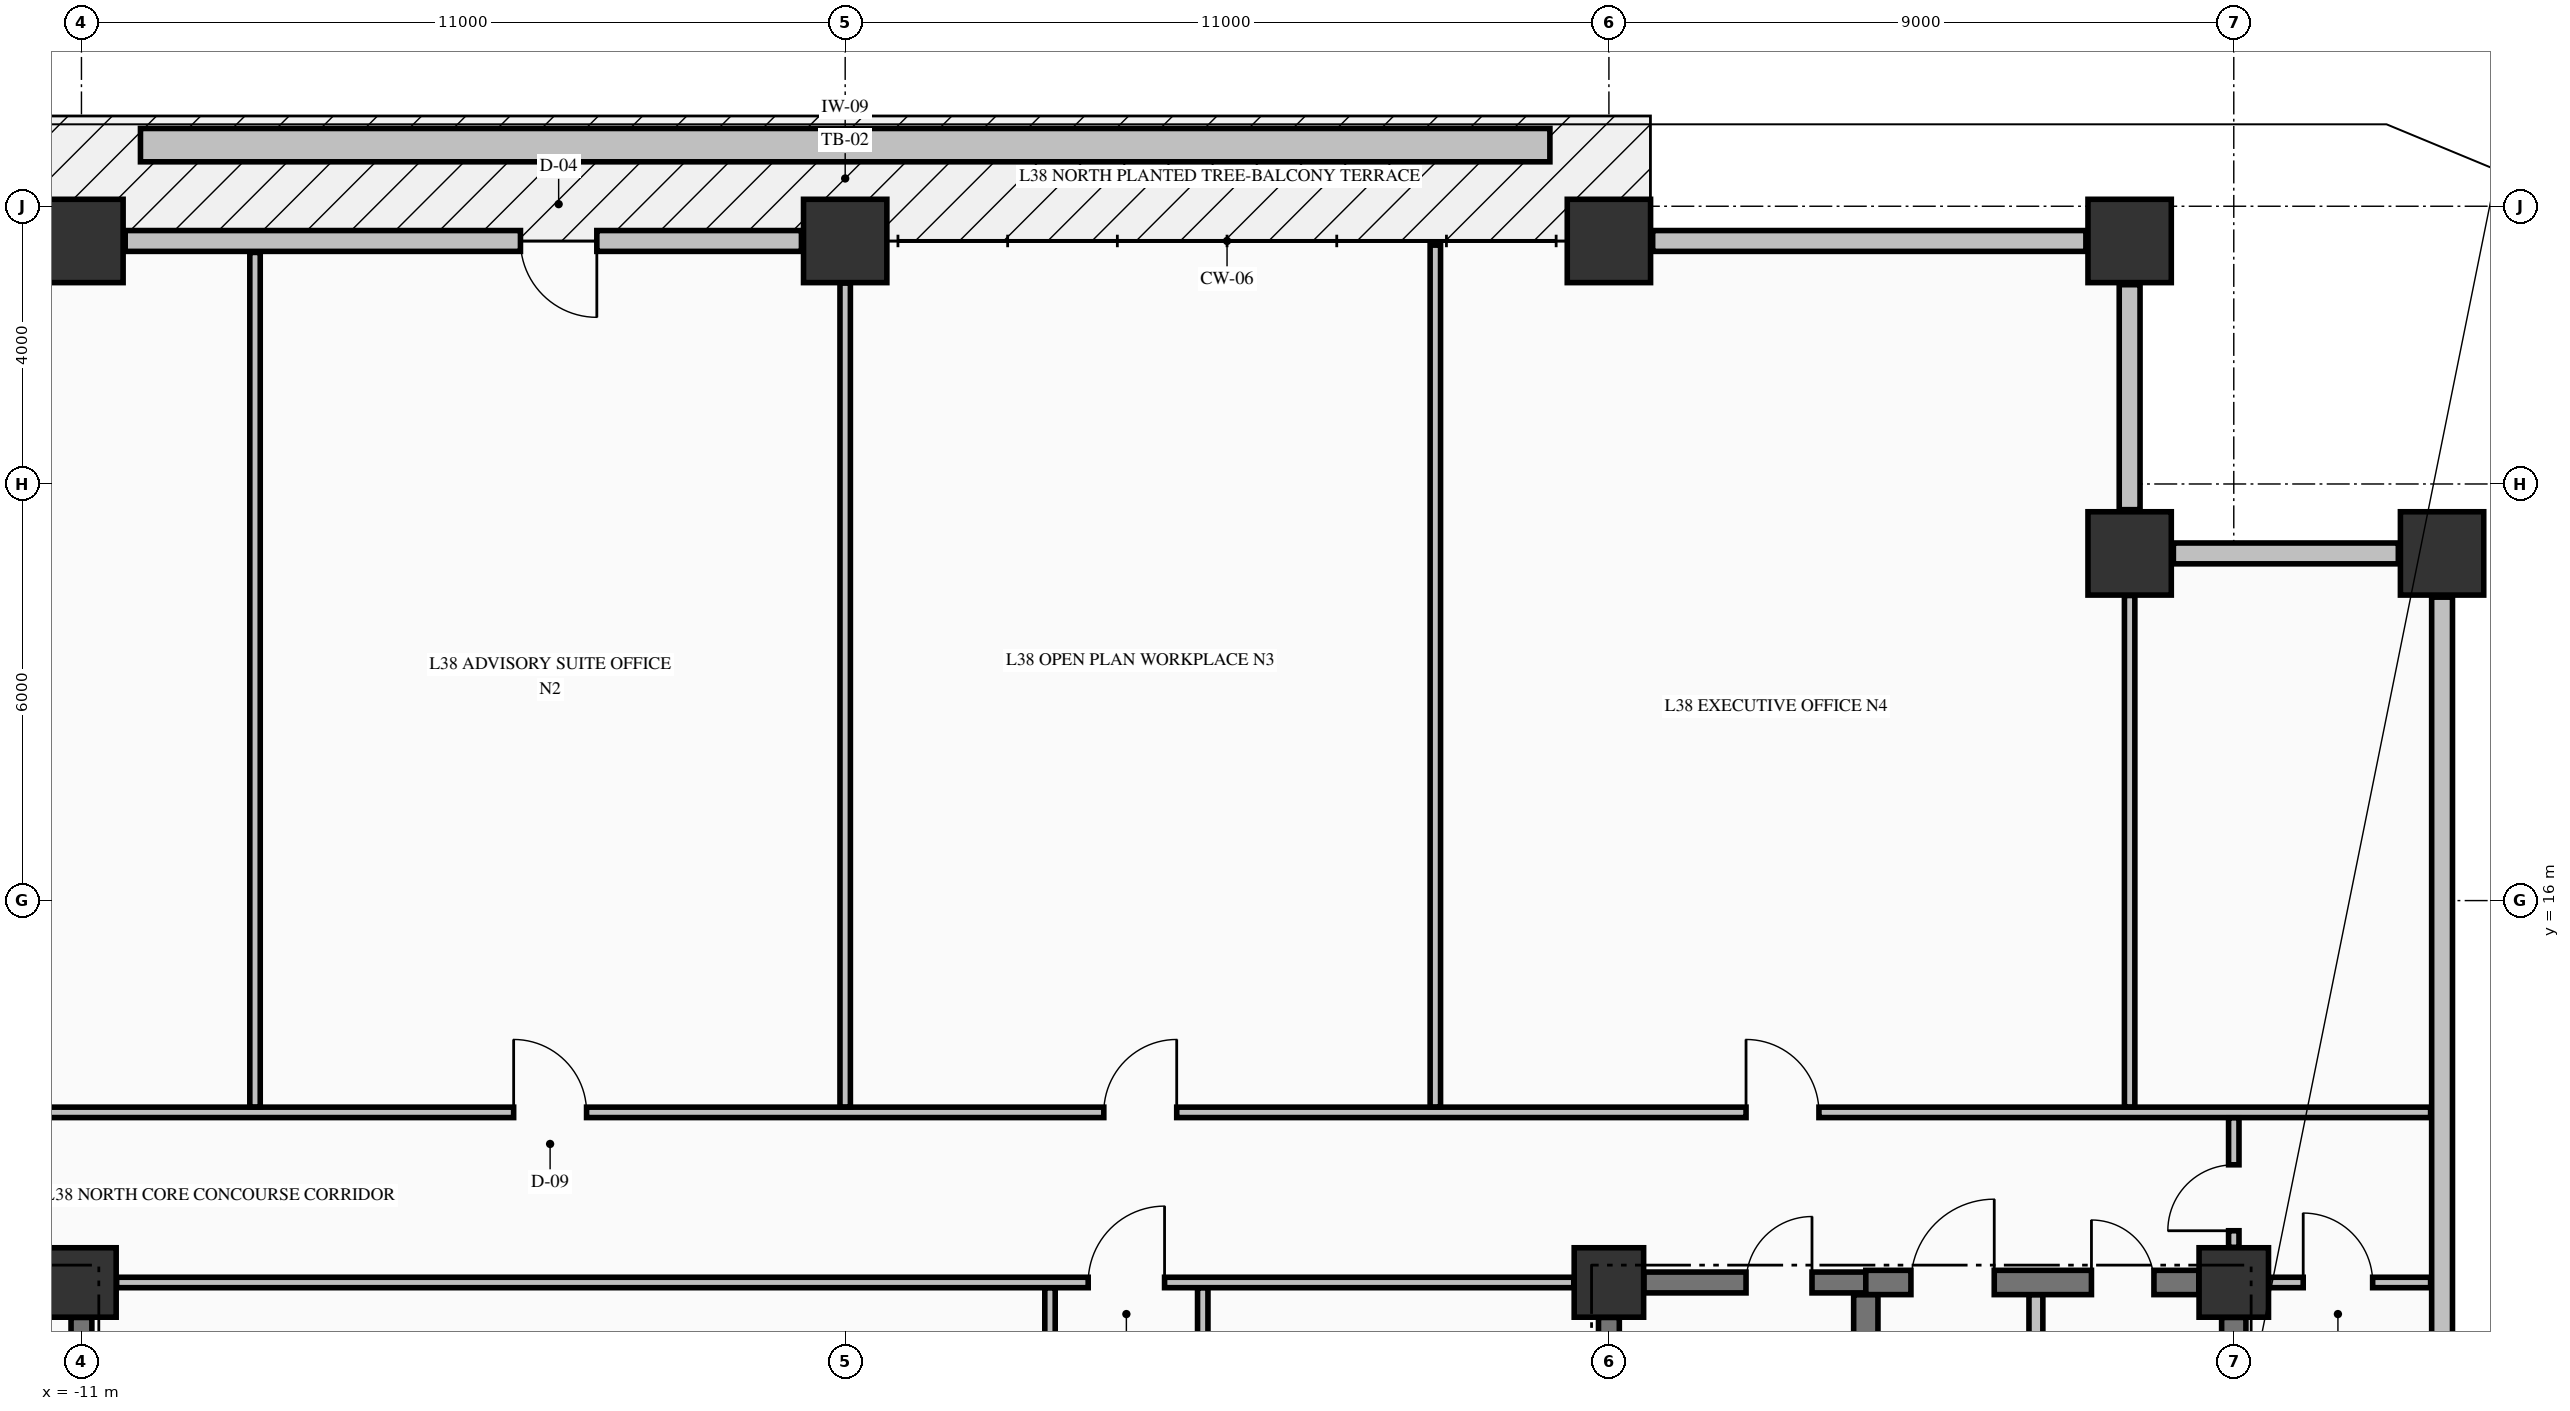
"""IFC4 building model, lengths in metres.
Left out: names, types, materials, properties, quantities, classifications, styles, units other than length and angle.
Written with IfcOpenShell. Run it as: python <this file> out.ifc"""

import sys

from ifc_helpers import new_model, si_unit, direction, frame, frame_2d, origin, origin_2d, place, context, subcontext, project, spatial, rectangle, extrude, element, fill, save


model = new_model("IFC4")
c1 = context("Model", 3, precision=1e-05, world=origin(), true_north=direction((0.0, 1.0)))
c2 = subcontext(c1, "Body", "Model", "MODEL_VIEW")
j1 = project(units=[si_unit("LENGTHUNIT", "METRE"), si_unit("PLANEANGLEUNIT", "RADIAN")], contexts=[c1])
p1 = place(None, origin())
s1 = spatial("IfcSite", under=j1, at=p1, CompositionType="ELEMENT")
p2 = place(p1, origin())
s2 = spatial("IfcBuilding", under=s1, at=p2, CompositionType="ELEMENT")
p3 = place(p2, frame((0.0, 0.0, 149.91)))
s3 = spatial("IfcBuildingStorey", under=s2, at=p3, CompositionType="ELEMENT", Elevation=149.91)
for number, where, z_axis, x_axis in (
    (1, (-11.0, 25.5, -0.25), (0.0, 0.0, 1.0), (1.0, 0.0, 0.0)),
    (2, (0.0, 25.5, -0.25), (0.0, 0.0, 1.0), (1.0, 0.0, 0.0)),
    (3, (11.0, 25.5, -0.25), (0.0, 0.0, 1.0), (1.0, 0.0, 0.0)),
    (4, (18.5, 25.5, -0.25), (0.0, 0.0, 1.0), (1.0, 0.0, 0.0)),
    (5, (23.0, 21.0, -0.25), (0.0, 0.0, 1.0), (1.0, 0.0, 0.0)),
    (6, (18.5, 21.0, -0.25), (0.0, 0.0, 1.0), (1.0, 0.0, 0.0)),
):
    element("IfcColumn", number, at=place(p3, frame(where, z_axis=z_axis, x_axis=x_axis)), inside=s3, PredefinedType="COLUMN", context=c2, shape_type="SweptSolid", body=[
        extrude(rectangle(XDim=1.2, YDim=1.2, at=origin_2d()), origin(), (0.0, 0.0, 1.0), 3.395),
    ])
for number, where, z_axis, x_axis in (
    (7, (-11.0, 10.5, -0.25), (0.0, 0.0, 1.0), (1.0, 0.0, 0.0)),
    (8, (11.0, 10.5, -0.25), (0.0, 0.0, 1.0), (1.0, 0.0, 0.0)),
    (9, (20.0, 10.5, -0.25), (0.0, 0.0, 1.0), (1.0, 0.0, 0.0)),
):
    element("IfcColumn", number, at=place(p3, frame(where, z_axis=z_axis, x_axis=x_axis)), inside=s3, PredefinedType="COLUMN", context=c2, shape_type="SweptSolid", body=[
        extrude(rectangle(XDim=1.0, YDim=1.0, at=origin_2d()), origin(), (0.0, 0.0, 1.0), 3.395),
    ])
for number, where, z_axis, x_axis in (
    (10, (22.37, 21.0, 0.0), (0.0, 0.0, 1.0), (-1.0, 0.0, 0.0)),
    (11, (18.5, 21.63, 0.0), (0.0, 0.0, 1.0), (0.0, 1.0, 0.0)),
):
    element("IfcWall", number, at=place(p3, frame(where, z_axis=z_axis, x_axis=x_axis)), inside=s3, PredefinedType="STANDARD", context=c2, shape_type="SweptSolid", body=[
        extrude(rectangle(XDim=3.24, YDim=0.3, at=frame_2d((1.62, 0.0))), origin(), (0.0, 0.0, 1.0), 2.537),
    ])
p4 = place(p3, frame((-0.63, 25.5, 0.0), z_axis=(0.0, 0.0, 1.0), x_axis=(-1.0, 0.0, 0.0)))
e12 = element("IfcWall", 12, at=p4, inside=s3, PredefinedType="STANDARD", context=c2, shape_type="SweptSolid", body=[
    extrude(rectangle(XDim=9.74, YDim=0.3, at=frame_2d((4.87, 0.0))), origin(), (0.0, 0.0, 1.0), 2.537),
])
p5 = place(p4, frame((2.947, 0.0, 0.0)))
e13 = element("IfcOpeningElement", 13, at=p5, cuts=e12, PredefinedType="OPENING", context=c2, shape_type="SweptSolid", body=[
    extrude(rectangle(XDim=1.1, YDim=2.15, at=frame_2d((0.55, 1.075))), frame((0.0, 0.16, 0.0), z_axis=(0.0, -1.0, 0.0), x_axis=(1.0, 0.0, 0.0)), (0.0, 0.0, 1.0), 0.32),
])
p6 = place(p3, frame((17.87, 25.5, 0.0), z_axis=(0.0, 0.0, 1.0), x_axis=(-1.0, 0.0, 0.0)))
e14 = element("IfcWall", 14, at=p6, inside=s3, PredefinedType="STANDARD", context=c2, shape_type="SweptSolid", body=[
    extrude(rectangle(XDim=6.24, YDim=0.3, at=frame_2d((3.12, 0.0))), origin(), (0.0, 0.0, 1.0), 2.537),
])
p7 = place(p3, frame((23.0, 9.63, 0.0), z_axis=(0.0, 0.0, 1.0), x_axis=(0.0, 1.0, 0.0)))
e15 = element("IfcWall", 15, at=p7, inside=s3, PredefinedType="STANDARD", context=c2, shape_type="SweptSolid", body=[
    extrude(rectangle(XDim=10.74, YDim=0.3, at=frame_2d((5.37, 0.0))), origin(), (0.0, 0.0, 1.0), 2.537),
])
p8 = place(p3, frame((11.504, 10.5, 0.0), z_axis=(0.0, 0.0, 1.0), x_axis=(1.0, 0.0, 0.0)))
e16 = element("IfcWall", 16, at=p8, inside=s3, PredefinedType="SHEAR", context=c2, shape_type="SweptSolid", body=[
    extrude(rectangle(XDim=3.196, YDim=0.3, at=frame_2d((1.598, 0.0))), origin(), (0.0, 0.0, 1.0), 3.145),
])
p9 = place(p8, frame((1.471, 0.0, 0.0)))
e17 = element("IfcOpeningElement", 17, at=p9, cuts=e16, PredefinedType="OPENING", context=c2, shape_type="SweptSolid", body=[
    extrude(rectangle(XDim=0.95, YDim=2.15, at=frame_2d((0.475, 1.075))), frame((0.0, 0.16, 0.0), z_axis=(0.0, -1.0, 0.0), x_axis=(1.0, 0.0, 0.0)), (0.0, 0.0, 1.0), 0.32),
])
p10 = place(p3, frame((14.7, 10.5, 0.0), z_axis=(0.0, 0.0, 1.0), x_axis=(1.0, 0.0, 0.0)))
e18 = element("IfcWall", 18, at=p10, inside=s3, PredefinedType="SHEAR", context=c2, shape_type="SweptSolid", body=[
    extrude(rectangle(XDim=4.796, YDim=0.35, at=frame_2d((2.398, 0.0))), origin(), (0.0, 0.0, 1.0), 3.145),
])
p11 = place(p10, frame((0.65, 0.0, 0.0)))
e19 = element("IfcOpeningElement", 19, at=p11, cuts=e18, PredefinedType="OPENING", context=c2, shape_type="SweptSolid", body=[
    extrude(rectangle(XDim=1.2, YDim=2.15, at=frame_2d((0.6, 1.075))), frame((0.0, 0.185, 0.0), z_axis=(0.0, -1.0, 0.0), x_axis=(1.0, 0.0, 0.0)), (0.0, 0.0, 1.0), 0.37),
])
p12 = place(p10, frame((3.25, 0.0, 0.0)))
e20 = element("IfcOpeningElement", 20, at=p12, cuts=e18, PredefinedType="OPENING", context=c2, shape_type="SweptSolid", body=[
    extrude(rectangle(XDim=0.9, YDim=2.15, at=frame_2d((0.45, 1.075))), frame((0.0, 0.185, 0.0), z_axis=(0.0, -1.0, 0.0), x_axis=(1.0, 0.0, 0.0)), (0.0, 0.0, 1.0), 0.37),
])
p13 = place(p3, frame((-10.494, 10.5, 0.0), z_axis=(0.0, 0.0, 1.0), x_axis=(1.0, 0.0, 0.0)))
e21 = element("IfcWall", 21, at=p13, inside=s3, PredefinedType="PARTITIONING", context=c2, shape_type="SweptSolid", body=[
    extrude(rectangle(XDim=20.988, YDim=0.15, at=frame_2d((10.494, 0.0))), origin(), (0.0, 0.0, 1.0), 3.145),
])
p14 = place(p13, frame((13.994, 0.0, 0.0)))
e22 = element("IfcOpeningElement", 22, at=p14, cuts=e21, PredefinedType="OPENING", context=c2, shape_type="SweptSolid", body=[
    extrude(rectangle(XDim=1.1, YDim=2.15, at=frame_2d((0.55, 1.075))), frame((0.0, 0.085, 0.0), z_axis=(0.0, -1.0, 0.0), x_axis=(1.0, 0.0, 0.0)), (0.0, 0.0, 1.0), 0.17),
])
p15 = place(p3, frame((20.506, 10.5, 0.0), z_axis=(0.0, 0.0, 1.0), x_axis=(1.0, 0.0, 0.0)))
e23 = element("IfcWall", 23, at=p15, inside=s3, PredefinedType="PARTITIONING", context=c2, shape_type="SweptSolid", body=[
    extrude(rectangle(XDim=2.329, YDim=0.15, at=frame_2d((1.165, 0.0))), origin(), (0.0, 0.0, 1.0), 3.145),
])
p16 = place(p15, frame((0.494, 0.0, 0.0)))
e24 = element("IfcOpeningElement", 24, at=p16, cuts=e23, PredefinedType="OPENING", context=c2, shape_type="SweptSolid", body=[
    extrude(rectangle(XDim=1.0, YDim=2.15, at=frame_2d((0.5, 1.075))), frame((0.0, 0.085, 0.0), z_axis=(0.0, -1.0, 0.0), x_axis=(1.0, 0.0, 0.0)), (0.0, 0.0, 1.0), 0.17),
])
p17 = place(p3, frame((-27.835, 12.95, 0.0), z_axis=(0.0, 0.0, 1.0), x_axis=(1.0, 0.0, 0.0)))
e25 = element("IfcWall", 25, at=p17, inside=s3, PredefinedType="PARTITIONING", context=c2, shape_type="SweptSolid", body=[
    extrude(rectangle(XDim=50.67, YDim=0.15, at=frame_2d((25.335, 0.0))), origin(), (0.0, 0.0, 1.0), 3.145),
])
p18 = place(p17, frame((13.16, 0.0, 0.0)))
e26 = element("IfcOpeningElement", 26, at=p18, cuts=e25, PredefinedType="OPENING", context=c2, shape_type="SweptSolid", body=[
    extrude(rectangle(XDim=1.05, YDim=2.15, at=frame_2d((0.525, 1.075))), frame((0.0, 0.085, 0.0), z_axis=(0.0, -1.0, 0.0), x_axis=(1.0, 0.0, 0.0)), (0.0, 0.0, 1.0), 0.17),
])
p19 = place(p17, frame((23.06, 0.0, 0.0)))
e27 = element("IfcOpeningElement", 27, at=p19, cuts=e25, PredefinedType="OPENING", context=c2, shape_type="SweptSolid", body=[
    extrude(rectangle(XDim=1.05, YDim=2.15, at=frame_2d((0.525, 1.075))), frame((0.0, 0.085, 0.0), z_axis=(0.0, -1.0, 0.0), x_axis=(1.0, 0.0, 0.0)), (0.0, 0.0, 1.0), 0.17),
])
p20 = place(p17, frame((31.56, 0.0, 0.0)))
e28 = element("IfcOpeningElement", 28, at=p20, cuts=e25, PredefinedType="OPENING", context=c2, shape_type="SweptSolid", body=[
    extrude(rectangle(XDim=1.05, YDim=2.15, at=frame_2d((0.525, 1.075))), frame((0.0, 0.085, 0.0), z_axis=(0.0, -1.0, 0.0), x_axis=(1.0, 0.0, 0.0)), (0.0, 0.0, 1.0), 0.17),
])
p21 = place(p17, frame((40.81, 0.0, 0.0)))
e29 = element("IfcOpeningElement", 29, at=p21, cuts=e25, PredefinedType="OPENING", context=c2, shape_type="SweptSolid", body=[
    extrude(rectangle(XDim=1.05, YDim=2.15, at=frame_2d((0.525, 1.075))), frame((0.0, 0.085, 0.0), z_axis=(0.0, -1.0, 0.0), x_axis=(1.0, 0.0, 0.0)), (0.0, 0.0, 1.0), 0.17),
])
for number, where, z_axis, x_axis in (
    (30, (-11.0, 5.852, 0.0), (0.0, 0.0, 1.0), (0.0, 1.0, 0.0)),
    (31, (11.0, 5.852, 0.0), (0.0, 0.0, 1.0), (0.0, 1.0, 0.0)),
):
    element("IfcWall", number, at=place(p3, frame(where, z_axis=z_axis, x_axis=x_axis)), inside=s3, PredefinedType="SHEAR", context=c2, shape_type="SweptSolid", body=[
        extrude(rectangle(XDim=4.144, YDim=0.3, at=frame_2d((2.072, 0.0))), origin(), (0.0, 0.0, 1.0), 3.145),
    ])
p22 = place(p3, frame((14.7, 5.852, 0.0), z_axis=(0.0, 0.0, 1.0), x_axis=(0.0, 1.0, 0.0)))
e32 = element("IfcWall", 32, at=p22, inside=s3, PredefinedType="SHEAR", context=c2, shape_type="SweptSolid", body=[
    extrude(rectangle(XDim=4.471, YDim=0.35, at=frame_2d((2.235, 0.0))), origin(), (0.0, 0.0, 1.0), 3.145),
])
p23 = place(p3, frame((20.0, 5.377, 0.0), z_axis=(0.0, 0.0, 1.0), x_axis=(0.0, 1.0, 0.0)))
e33 = element("IfcWall", 33, at=p23, inside=s3, PredefinedType="SHEAR", context=c2, shape_type="SweptSolid", body=[
    extrude(rectangle(XDim=4.619, YDim=0.35, at=frame_2d((2.31, 0.0))), origin(), (0.0, 0.0, 1.0), 3.145),
])
p24 = place(p3, frame((-8.5, 13.028, 0.0), z_axis=(0.0, 0.0, 1.0), x_axis=(0.0, 1.0, 0.0)))
e34 = element("IfcWall", 34, at=p24, inside=s3, PredefinedType="PARTITIONING", context=c2, shape_type="SweptSolid", body=[
    extrude(rectangle(XDim=12.307, YDim=0.15, at=frame_2d((6.153, 0.0))), origin(), (0.0, 0.0, 1.0), 3.145),
])
p25 = place(p3, frame((0.0, 13.028, 0.0), z_axis=(0.0, 0.0, 1.0), x_axis=(0.0, 1.0, 0.0)))
e35 = element("IfcWall", 35, at=p25, inside=s3, PredefinedType="PARTITIONING", context=c2, shape_type="SweptSolid", body=[
    extrude(rectangle(XDim=11.866, YDim=0.15, at=frame_2d((5.933, 0.0))), origin(), (0.0, 0.0, 1.0), 2.635),
])
for number, where, z_axis, x_axis in (
    (36, (2.95, 2.978, 0.0), (0.0, 0.0, 1.0), (0.0, 1.0, 0.0)),
    (37, (5.15, 2.978, 0.0), (0.0, 0.0, 1.0), (0.0, 1.0, 0.0)),
):
    element("IfcWall", number, at=place(p3, frame(where, z_axis=z_axis, x_axis=x_axis)), inside=s3, PredefinedType="PARTITIONING", context=c2, shape_type="SweptSolid", body=[
        extrude(rectangle(XDim=7.444, YDim=0.15, at=frame_2d((3.722, 0.0))), origin(), (0.0, 0.0, 1.0), 3.145),
    ])
p26 = place(p3, frame((8.5, 13.028, 0.0), z_axis=(0.0, 0.0, 1.0), x_axis=(0.0, 1.0, 0.0)))
e38 = element("IfcWall", 38, at=p26, inside=s3, PredefinedType="PARTITIONING", context=c2, shape_type="SweptSolid", body=[
    extrude(rectangle(XDim=12.412, YDim=0.15, at=frame_2d((6.206, 0.0))), origin(), (0.0, 0.0, 1.0), 3.145),
])
p27 = place(p3, frame((17.15, 5.378, 0.0), z_axis=(0.0, 0.0, 1.0), x_axis=(0.0, 1.0, 0.0)))
e39 = element("IfcWall", 39, at=p27, inside=s3, PredefinedType="PARTITIONING", context=c2, shape_type="SweptSolid", body=[
    extrude(rectangle(XDim=4.944, YDim=0.2, at=frame_2d((2.472, 0.0))), origin(), (0.0, 0.0, 1.0), 3.145),
])
p28 = place(p3, frame((18.5, 13.028, 0.0), z_axis=(0.0, 0.0, 1.0), x_axis=(0.0, 1.0, 0.0)))
e40 = element("IfcWall", 40, at=p28, inside=s3, PredefinedType="PARTITIONING", context=c2, shape_type="SweptSolid", body=[
    extrude(rectangle(XDim=7.366, YDim=0.15, at=frame_2d((3.683, 0.0))), origin(), (0.0, 0.0, 1.0), 3.145),
])
p29 = place(p3, frame((20.0, 11.006, 0.0), z_axis=(0.0, 0.0, 1.0), x_axis=(0.0, 1.0, 0.0)))
e41 = element("IfcWall", 41, at=p29, inside=s3, PredefinedType="PARTITIONING", context=c2, shape_type="SweptSolid", body=[
    extrude(rectangle(XDim=1.866, YDim=0.15, at=frame_2d((0.933, 0.0))), origin(), (0.0, 0.0, 1.0), 2.635),
])
p30 = place(p29, frame((0.239, 0.0, 0.0)))
e42 = element("IfcOpeningElement", 42, at=p30, cuts=e41, PredefinedType="OPENING", context=c2, shape_type="SweptSolid", body=[
    extrude(rectangle(XDim=0.95, YDim=2.15, at=frame_2d((0.475, 1.075))), frame((0.0, 0.085, 0.0), z_axis=(0.0, -1.0, 0.0), x_axis=(1.0, 0.0, 0.0)), (0.0, 0.0, 1.0), 0.17),
])
p31 = place(p3, frame((-10.15, 26.88, -0.04), z_axis=(0.0, 0.0, 1.0), x_axis=(1.0, 0.0, 0.0)))
e43 = element("IfcWall", 43, at=p31, inside=s3, PredefinedType="PARAPET", context=c2, shape_type="SweptSolid", body=[
    extrude(rectangle(XDim=20.3, YDim=0.48, at=frame_2d((10.15, 0.0))), origin(), (0.0, 0.0, 1.0), 0.52),
])
p32 = place(p5, origin())
e44 = element("IfcDoor", 44, at=p32, inside=s3, OperationType="SINGLE_SWING_LEFT", PredefinedType="DOOR", context=c2, shape_type="SweptSolid", body=[
    extrude(rectangle(XDim=1.1, YDim=2.15, at=frame_2d((0.55, 1.075))), frame((0.0, 0.025, 0.0), z_axis=(0.0, -1.0, 0.0), x_axis=(1.0, 0.0, 0.0)), (0.0, 0.0, 1.0), 0.05),
])
fill(e13, e44)
p33 = place(p9, origin())
e45 = element("IfcDoor", 45, at=p33, inside=s3, OperationType="SINGLE_SWING_RIGHT", PredefinedType="DOOR", context=c2, shape_type="SweptSolid", body=[
    extrude(rectangle(XDim=0.95, YDim=2.15, at=frame_2d((0.475, 1.075))), frame((0.0, 0.025, 0.0), z_axis=(0.0, -1.0, 0.0), x_axis=(1.0, 0.0, 0.0)), (0.0, 0.0, 1.0), 0.05),
])
fill(e17, e45)
p34 = place(p11, origin())
e46 = element("IfcDoor", 46, at=p34, inside=s3, OperationType="SINGLE_SWING_RIGHT", PredefinedType="DOOR", context=c2, shape_type="SweptSolid", body=[
    extrude(rectangle(XDim=1.2, YDim=2.15, at=frame_2d((0.6, 1.075))), frame((0.0, 0.025, 0.0), z_axis=(0.0, -1.0, 0.0), x_axis=(1.0, 0.0, 0.0)), (0.0, 0.0, 1.0), 0.05),
])
fill(e19, e46)
p35 = place(p12, origin())
e47 = element("IfcDoor", 47, at=p35, inside=s3, OperationType="SINGLE_SWING_LEFT", PredefinedType="DOOR", context=c2, shape_type="SweptSolid", body=[
    extrude(rectangle(XDim=0.9, YDim=2.15, at=frame_2d((0.45, 1.075))), frame((0.0, 0.025, 0.0), z_axis=(0.0, -1.0, 0.0), x_axis=(1.0, 0.0, 0.0)), (0.0, 0.0, 1.0), 0.05),
])
fill(e20, e47)
p36 = place(p14, origin())
e48 = element("IfcDoor", 48, at=p36, inside=s3, OperationType="SINGLE_SWING_RIGHT", PredefinedType="DOOR", context=c2, shape_type="SweptSolid", body=[
    extrude(rectangle(XDim=1.1, YDim=2.15, at=frame_2d((0.55, 1.075))), frame((0.0, 0.025, 0.0), z_axis=(0.0, -1.0, 0.0), x_axis=(1.0, 0.0, 0.0)), (0.0, 0.0, 1.0), 0.05),
])
fill(e22, e48)
p37 = place(p19, origin())
e49 = element("IfcDoor", 49, at=p37, inside=s3, OperationType="SINGLE_SWING_LEFT", PredefinedType="DOOR", context=c2, shape_type="SweptSolid", body=[
    extrude(rectangle(XDim=1.05, YDim=2.15, at=frame_2d((0.525, 1.075))), frame((0.0, 0.025, 0.0), z_axis=(0.0, -1.0, 0.0), x_axis=(1.0, 0.0, 0.0)), (0.0, 0.0, 1.0), 0.05),
])
fill(e27, e49)
p38 = place(p20, origin())
e50 = element("IfcDoor", 50, at=p38, inside=s3, OperationType="SINGLE_SWING_RIGHT", PredefinedType="DOOR", context=c2, shape_type="SweptSolid", body=[
    extrude(rectangle(XDim=1.05, YDim=2.15, at=frame_2d((0.525, 1.075))), frame((0.0, 0.025, 0.0), z_axis=(0.0, -1.0, 0.0), x_axis=(1.0, 0.0, 0.0)), (0.0, 0.0, 1.0), 0.05),
])
fill(e28, e50)
p39 = place(p21, origin())
e51 = element("IfcDoor", 51, at=p39, inside=s3, OperationType="SINGLE_SWING_LEFT", PredefinedType="DOOR", context=c2, shape_type="SweptSolid", body=[
    extrude(rectangle(XDim=1.05, YDim=2.15, at=frame_2d((0.525, 1.075))), frame((0.0, 0.025, 0.0), z_axis=(0.0, -1.0, 0.0), x_axis=(1.0, 0.0, 0.0)), (0.0, 0.0, 1.0), 0.05),
])
fill(e29, e51)
p40 = place(p30, origin())
e52 = element("IfcDoor", 52, at=p40, inside=s3, OperationType="SINGLE_SWING_LEFT", PredefinedType="DOOR", context=c2, shape_type="SweptSolid", body=[
    extrude(rectangle(XDim=0.95, YDim=2.15, at=frame_2d((0.475, 1.075))), frame((0.0, 0.025, 0.0), z_axis=(0.0, -1.0, 0.0), x_axis=(1.0, 0.0, 0.0)), (0.0, 0.0, 1.0), 0.05),
])
fill(e42, e52)
p41 = place(p16, origin())
e53 = element("IfcDoor", 53, at=p41, inside=s3, OperationType="SINGLE_SWING_LEFT", PredefinedType="DOOR", context=c2, shape_type="SweptSolid", body=[
    extrude(rectangle(XDim=1.0, YDim=2.15, at=frame_2d((0.5, 1.075))), frame((0.0, 0.025, 0.0), z_axis=(0.0, -1.0, 0.0), x_axis=(1.0, 0.0, 0.0)), (0.0, 0.0, 1.0), 0.05),
])
fill(e24, e53)
save(model, sys.argv[1])
